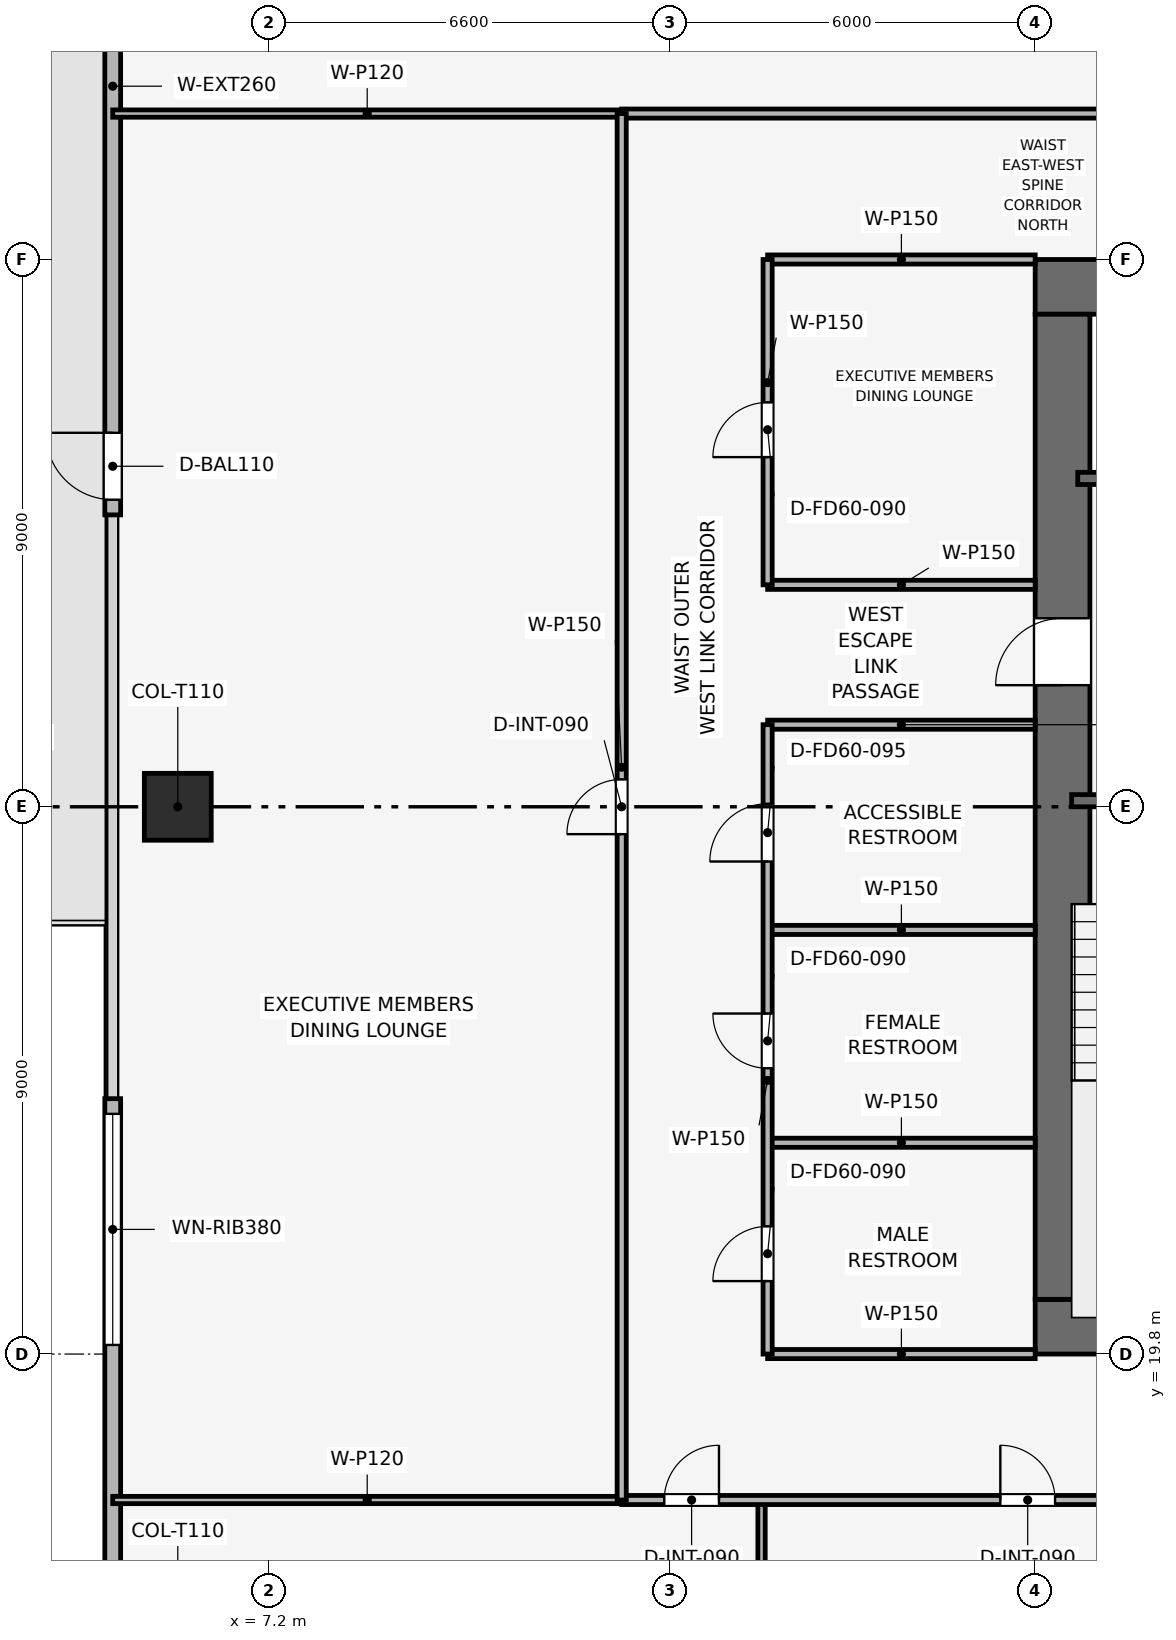
"""IFC4 building model, lengths in metres.
Left out: names, types, materials, properties, quantities, classifications, styles, units other than length and angle.
Written with IfcOpenShell. Run it as: python <this file> out.ifc"""

import sys

from ifc_helpers import new_model, si_unit, direction, frame, frame_2d, origin, origin_2d, place, context, subcontext, project, spatial, rectangle, extrude, element, fill, save


model = new_model("IFC4")
c1 = context("Model", 3, precision=1e-05, world=origin(), true_north=direction((0.0, 1.0)))
c2 = subcontext(c1, "Body", "Model", "MODEL_VIEW")
j1 = project(units=[si_unit("LENGTHUNIT", "METRE"), si_unit("PLANEANGLEUNIT", "RADIAN")], contexts=[c1])
p1 = place(None, origin())
s1 = spatial("IfcSite", under=j1, at=p1, CompositionType="ELEMENT")
p2 = place(p1, origin())
s2 = spatial("IfcBuilding", under=s1, at=p2, CompositionType="ELEMENT")
p3 = place(p2, frame((0.0, 0.0, 149.55)))
s3 = spatial("IfcBuildingStorey", under=s2, at=p3, CompositionType="ELEMENT", Elevation=149.55)
p4 = place(p3, frame((19.8, 20.25, 0.0), z_axis=(0.0, 0.0, 1.0), x_axis=(1.0, 0.0, 0.0)))
e1 = element("IfcWall", 1, at=p4, inside=s3, PredefinedType="SHEAR", context=c2, shape_type="SweptSolid", body=[
    extrude(rectangle(XDim=18.0, YDim=0.9, at=frame_2d((9.0, 0.0))), origin(), (0.0, 0.0, 1.0), 3.75),
])
p5 = place(p4, frame((8.4, 0.0, 0.0)))
e2 = element("IfcOpeningElement", 2, at=p5, cuts=e1, PredefinedType="OPENING", context=c2, shape_type="SweptSolid", body=[
    extrude(rectangle(XDim=1.2, YDim=2.2, at=frame_2d((0.6, 1.1))), frame((0.0, 0.46, 0.0), z_axis=(0.0, -1.0, 0.0), x_axis=(1.0, 0.0, 0.0)), (0.0, 0.0, 1.0), 0.92),
])
p6 = place(p3, frame((19.8, 37.35, 0.0), z_axis=(0.0, 0.0, 1.0), x_axis=(1.0, 0.0, 0.0)))
e3 = element("IfcWall", 3, at=p6, inside=s3, PredefinedType="SHEAR", context=c2, shape_type="SweptSolid", body=[
    extrude(rectangle(XDim=18.0, YDim=0.9, at=frame_2d((9.0, 0.0))), origin(), (0.0, 0.0, 1.0), 3.75),
])
p7 = place(p6, frame((7.05, 0.0, 0.0)))
e4 = element("IfcOpeningElement", 4, at=p7, cuts=e3, PredefinedType="OPENING", context=c2, shape_type="SweptSolid", body=[
    extrude(rectangle(XDim=1.1, YDim=2.15, at=frame_2d((0.55, 1.075))), frame((0.0, 0.46, 0.0), z_axis=(0.0, -1.0, 0.0), x_axis=(1.0, 0.0, 0.0)), (0.0, 0.0, 1.0), 0.92),
])
p8 = place(p3, frame((20.25, 20.7, 0.0), z_axis=(0.0, 0.0, 1.0), x_axis=(0.0, 1.0, 0.0)))
e5 = element("IfcWall", 5, at=p8, inside=s3, PredefinedType="SHEAR", context=c2, shape_type="SweptSolid", body=[
    extrude(rectangle(XDim=16.2, YDim=0.9, at=frame_2d((8.1, 0.0))), origin(), (0.0, 0.0, 1.0), 3.75),
])
p9 = place(p8, frame((10.1, 0.0, 0.0)))
e6 = element("IfcOpeningElement", 6, at=p9, cuts=e5, PredefinedType="OPENING", context=c2, shape_type="SweptSolid", body=[
    extrude(rectangle(XDim=1.1, YDim=2.15, at=frame_2d((0.55, 1.075))), frame((0.0, 0.46, 0.0), z_axis=(0.0, -1.0, 0.0), x_axis=(1.0, 0.0, 0.0)), (0.0, 0.0, 1.0), 0.92),
])
p10 = place(p3, frame((5.7, 28.8, 0.003), z_axis=(0.0, 0.0, 1.0), x_axis=(1.0, 0.0, 0.0)))
e7 = element("IfcColumn", 7, at=p10, inside=s3, PredefinedType="COLUMN", context=c2, shape_type="SweptSolid", body=[
    extrude(rectangle(XDim=1.1, YDim=1.1, at=origin_2d()), origin(), (0.0, 0.0, 1.0), 3.489),
])
p11 = place(p3, frame((4.63, 11.4, 0.0), z_axis=(0.0, 0.0, 1.0), x_axis=(0.0, 1.0, 0.0)))
e8 = element("IfcWall", 8, at=p11, inside=s3, PredefinedType="SOLIDWALL", context=c2, shape_type="SweptSolid", body=[
    extrude(rectangle(XDim=12.6, YDim=0.26, at=frame_2d((6.3, 0.0))), origin(), (0.0, 0.0, 1.0), 3.495),
])
p12 = place(p11, frame((8.55, 0.0, 0.9)))
e9 = element("IfcOpeningElement", 9, at=p12, cuts=e8, PredefinedType="OPENING", context=c2, shape_type="SweptSolid", body=[
    extrude(rectangle(XDim=3.8, YDim=1.9, at=frame_2d((1.9, 0.95))), frame((0.0, 0.14, 0.0), z_axis=(0.0, -1.0, 0.0), x_axis=(1.0, 0.0, 0.0)), (0.0, 0.0, 1.0), 0.28),
])
p13 = place(p3, frame((4.63, 33.6, 0.0), z_axis=(0.0, 0.0, 1.0), x_axis=(0.0, 1.0, 0.0)))
e10 = element("IfcWall", 10, at=p13, inside=s3, PredefinedType="SOLIDWALL", context=c2, shape_type="SweptSolid", body=[
    extrude(rectangle(XDim=12.6, YDim=0.26, at=frame_2d((6.3, 0.0))), origin(), (0.0, 0.0, 1.0), 3.495),
])
p14 = place(p13, frame((0.25, 0.0, 0.0)))
e11 = element("IfcOpeningElement", 11, at=p14, cuts=e10, PredefinedType="OPENING", context=c2, shape_type="SweptSolid", body=[
    extrude(rectangle(XDim=1.1, YDim=2.2, at=frame_2d((0.55, 1.1))), frame((0.0, 0.14, 0.0), z_axis=(0.0, -1.0, 0.0), x_axis=(1.0, 0.0, 0.0)), (0.0, 0.0, 1.0), 0.28),
])
p15 = place(p3, frame((20.4, 28.9, 0.0), z_axis=(0.0, 0.0, 1.0), x_axis=(1.0, 0.0, 0.0)))
e12 = element("IfcWall", 12, at=p15, inside=s3, PredefinedType="SHEAR", context=c2, shape_type="SweptSolid", body=[
    extrude(rectangle(XDim=3.15, YDim=0.2, at=frame_2d((1.575, 0.0))), origin(), (0.0, 0.0, 1.0), 3.495),
])
p16 = place(p15, frame((0.8, 0.0, 0.0)))
e13 = element("IfcOpeningElement", 13, at=p16, cuts=e12, PredefinedType="OPENING", context=c2, shape_type="SweptSolid", body=[
    extrude(rectangle(XDim=1.0, YDim=2.1, at=frame_2d((0.5, 1.05))), frame((0.0, 0.11, 0.0), z_axis=(0.0, -1.0, 0.0), x_axis=(1.0, 0.0, 0.0)), (0.0, 0.0, 1.0), 0.22),
])
p17 = place(p3, frame((20.5, 34.2, 0.0), z_axis=(0.0, 0.0, 1.0), x_axis=(1.0, 0.0, 0.0)))
e14 = element("IfcWall", 14, at=p17, inside=s3, PredefinedType="SHEAR", context=c2, shape_type="SweptSolid", body=[
    extrude(rectangle(XDim=3.05, YDim=0.2, at=frame_2d((1.525, 0.0))), origin(), (0.0, 0.0, 1.0), 3.495),
])
p18 = place(p17, frame((0.75, 0.0, 0.0)))
e15 = element("IfcOpeningElement", 15, at=p18, cuts=e14, PredefinedType="OPENING", context=c2, shape_type="SweptSolid", body=[
    extrude(rectangle(XDim=1.1, YDim=2.15, at=frame_2d((0.55, 1.075))), frame((0.0, 0.11, 0.0), z_axis=(0.0, -1.0, 0.0), x_axis=(1.0, 0.0, 0.0)), (0.0, 0.0, 1.0), 0.22),
])
p19 = place(p3, frame((15.4, 19.8, 0.0), z_axis=(0.0, 0.0, 1.0), x_axis=(1.0, 0.0, 0.0)))
e16 = element("IfcWall", 16, at=p19, inside=s3, PredefinedType="PARTITIONING", context=c2, shape_type="SweptSolid", body=[
    extrude(rectangle(XDim=4.4, YDim=0.15, at=frame_2d((2.2, 0.0))), origin(), (0.0, 0.0, 1.0), 3.03),
])
for number, where, z_axis, x_axis in (
    (17, (15.4, 23.275, 0.0), (0.0, 0.0, 1.0), (1.0, 0.0, 0.0)),
    (18, (15.4, 26.775, 0.0), (0.0, 0.0, 1.0), (1.0, 0.0, 0.0)),
    (19, (15.4, 30.15, 0.0), (0.0, 0.0, 1.0), (1.0, 0.0, 0.0)),
    (20, (15.4, 32.45, 0.0), (0.0, 0.0, 1.0), (1.0, 0.0, 0.0)),
):
    element("IfcWall", number, at=place(p3, frame(where, z_axis=z_axis, x_axis=x_axis)), inside=s3, PredefinedType="PARTITIONING", context=c2, shape_type="SweptSolid", body=[
        extrude(rectangle(XDim=4.4, YDim=0.15, at=frame_2d((2.2, 0.0))), origin(), (0.0, 0.0, 1.0), 3.495),
    ])
p20 = place(p3, frame((15.4, 37.8, 0.0), z_axis=(0.0, 0.0, 1.0), x_axis=(1.0, 0.0, 0.0)))
e21 = element("IfcWall", 21, at=p20, inside=s3, PredefinedType="PARTITIONING", context=c2, shape_type="SweptSolid", body=[
    extrude(rectangle(XDim=4.4, YDim=0.15, at=frame_2d((2.2, 0.0))), origin(), (0.0, 0.0, 1.0), 3.03),
])
p21 = place(p3, frame((15.4, 19.8, 0.0), z_axis=(0.0, 0.0, 1.0), x_axis=(0.0, 1.0, 0.0)))
e22 = element("IfcWall", 22, at=p21, inside=s3, PredefinedType="PARTITIONING", context=c2, shape_type="SweptSolid", body=[
    extrude(rectangle(XDim=10.35, YDim=0.15, at=frame_2d((5.175, 0.0))), origin(), (0.0, 0.0, 1.0), 3.03),
])
p22 = place(p21, frame((1.2, 0.0, 0.0)))
e23 = element("IfcOpeningElement", 23, at=p22, cuts=e22, PredefinedType="OPENING", context=c2, shape_type="SweptSolid", body=[
    extrude(rectangle(XDim=0.9, YDim=2.1, at=frame_2d((0.45, 1.05))), frame((0.0, 0.085, 0.0), z_axis=(0.0, -1.0, 0.0), x_axis=(1.0, 0.0, 0.0)), (0.0, 0.0, 1.0), 0.17),
])
p23 = place(p21, frame((4.7, 0.0, 0.0)))
e24 = element("IfcOpeningElement", 24, at=p23, cuts=e22, PredefinedType="OPENING", context=c2, shape_type="SweptSolid", body=[
    extrude(rectangle(XDim=0.9, YDim=2.1, at=frame_2d((0.45, 1.05))), frame((0.0, 0.085, 0.0), z_axis=(0.0, -1.0, 0.0), x_axis=(1.0, 0.0, 0.0)), (0.0, 0.0, 1.0), 0.17),
])
p24 = place(p21, frame((8.1, 0.0, 0.0)))
e25 = element("IfcOpeningElement", 25, at=p24, cuts=e22, PredefinedType="OPENING", context=c2, shape_type="SweptSolid", body=[
    extrude(rectangle(XDim=0.95, YDim=2.1, at=frame_2d((0.475, 1.05))), frame((0.0, 0.085, 0.0), z_axis=(0.0, -1.0, 0.0), x_axis=(1.0, 0.0, 0.0)), (0.0, 0.0, 1.0), 0.17),
])
p25 = place(p3, frame((15.4, 32.45, 0.0), z_axis=(0.0, 0.0, 1.0), x_axis=(0.0, 1.0, 0.0)))
e26 = element("IfcWall", 26, at=p25, inside=s3, PredefinedType="PARTITIONING", context=c2, shape_type="SweptSolid", body=[
    extrude(rectangle(XDim=5.35, YDim=0.15, at=frame_2d((2.675, 0.0))), origin(), (0.0, 0.0, 1.0), 3.03),
])
p26 = place(p25, frame((2.1, 0.0, 0.0)))
e27 = element("IfcOpeningElement", 27, at=p26, cuts=e26, PredefinedType="OPENING", context=c2, shape_type="SweptSolid", body=[
    extrude(rectangle(XDim=0.9, YDim=2.1, at=frame_2d((0.45, 1.05))), frame((0.0, 0.085, 0.0), z_axis=(0.0, -1.0, 0.0), x_axis=(1.0, 0.0, 0.0)), (0.0, 0.0, 1.0), 0.17),
])
p27 = place(p3, frame((15.3, 4.63, 0.0), z_axis=(0.0, 0.0, 1.0), x_axis=(0.0, 1.0, 0.0)))
e28 = element("IfcWall", 28, at=p27, inside=s3, PredefinedType="PARTITIONING", context=c2, shape_type="SweptSolid", body=[
    extrude(rectangle(XDim=12.77, YDim=0.12, at=frame_2d((6.385, 0.0))), origin(), (0.0, 0.0, 1.0), 2.98),
])
for number, where, z_axis, x_axis in (
    (29, (4.63, 17.4, 0.0), (0.0, 0.0, 1.0), (1.0, 0.0, 0.0)),
    (30, (4.63, 40.2, 0.0), (0.0, 0.0, 1.0), (1.0, 0.0, 0.0)),
):
    element("IfcWall", number, at=place(p3, frame(where, z_axis=z_axis, x_axis=x_axis)), inside=s3, PredefinedType="PARTITIONING", context=c2, shape_type="SweptSolid", body=[
        extrude(rectangle(XDim=8.37, YDim=0.12, at=frame_2d((4.185, 0.0))), origin(), (0.0, 0.0, 1.0), 2.98),
    ])
p28 = place(p3, frame((13.0, 17.4, 0.0), z_axis=(0.0, 0.0, 1.0), x_axis=(1.0, 0.0, 0.0)))
e31 = element("IfcWall", 31, at=p28, inside=s3, PredefinedType="PARTITIONING", context=c2, shape_type="SweptSolid", body=[
    extrude(rectangle(XDim=31.6, YDim=0.15, at=frame_2d((15.8, 0.0))), origin(), (0.0, 0.0, 1.0), 3.03),
])
p29 = place(p28, frame((0.7, 0.0, 0.0)))
e32 = element("IfcOpeningElement", 32, at=p29, cuts=e31, PredefinedType="OPENING", context=c2, shape_type="SweptSolid", body=[
    extrude(rectangle(XDim=0.9, YDim=2.1, at=frame_2d((0.45, 1.05))), frame((0.0, 0.085, 0.0), z_axis=(0.0, -1.0, 0.0), x_axis=(1.0, 0.0, 0.0)), (0.0, 0.0, 1.0), 0.17),
])
p30 = place(p28, frame((6.227, 0.0, 0.0)))
e33 = element("IfcOpeningElement", 33, at=p30, cuts=e31, PredefinedType="OPENING", context=c2, shape_type="SweptSolid", body=[
    extrude(rectangle(XDim=0.9, YDim=2.1, at=frame_2d((0.45, 1.05))), frame((0.0, 0.085, 0.0), z_axis=(0.0, -1.0, 0.0), x_axis=(1.0, 0.0, 0.0)), (0.0, 0.0, 1.0), 0.17),
])
p31 = place(p28, frame((15.279, 0.0, 0.0)))
e34 = element("IfcOpeningElement", 34, at=p31, cuts=e31, PredefinedType="OPENING", context=c2, shape_type="SweptSolid", body=[
    extrude(rectangle(XDim=0.9, YDim=2.1, at=frame_2d((0.45, 1.05))), frame((0.0, 0.085, 0.0), z_axis=(0.0, -1.0, 0.0), x_axis=(1.0, 0.0, 0.0)), (0.0, 0.0, 1.0), 0.17),
])
p32 = place(p28, frame((25.552, 0.0, 0.0)))
e35 = element("IfcOpeningElement", 35, at=p32, cuts=e31, PredefinedType="OPENING", context=c2, shape_type="SweptSolid", body=[
    extrude(rectangle(XDim=0.9, YDim=2.1, at=frame_2d((0.45, 1.05))), frame((0.0, 0.085, 0.0), z_axis=(0.0, -1.0, 0.0), x_axis=(1.0, 0.0, 0.0)), (0.0, 0.0, 1.0), 0.17),
])
p33 = place(p3, frame((13.0, 40.2, 0.0), z_axis=(0.0, 0.0, 1.0), x_axis=(1.0, 0.0, 0.0)))
e36 = element("IfcWall", 36, at=p33, inside=s3, PredefinedType="PARTITIONING", context=c2, shape_type="SweptSolid", body=[
    extrude(rectangle(XDim=31.6, YDim=0.15, at=frame_2d((15.8, 0.0))), origin(), (0.0, 0.0, 1.0), 3.03),
])
p34 = place(p33, frame((8.395, 0.0, 0.0)))
e37 = element("IfcOpeningElement", 37, at=p34, cuts=e36, PredefinedType="OPENING", context=c2, shape_type="SweptSolid", body=[
    extrude(rectangle(XDim=0.9, YDim=2.1, at=frame_2d((0.45, 1.05))), frame((0.0, 0.085, 0.0), z_axis=(0.0, -1.0, 0.0), x_axis=(1.0, 0.0, 0.0)), (0.0, 0.0, 1.0), 0.17),
])
p35 = place(p33, frame((24.195, 0.0, 0.0)))
e38 = element("IfcOpeningElement", 38, at=p35, cuts=e36, PredefinedType="OPENING", context=c2, shape_type="SweptSolid", body=[
    extrude(rectangle(XDim=0.9, YDim=2.1, at=frame_2d((0.45, 1.05))), frame((0.0, 0.085, 0.0), z_axis=(0.0, -1.0, 0.0), x_axis=(1.0, 0.0, 0.0)), (0.0, 0.0, 1.0), 0.17),
])
p36 = place(p3, frame((13.0, 17.4, 0.0), z_axis=(0.0, 0.0, 1.0), x_axis=(0.0, 1.0, 0.0)))
e39 = element("IfcWall", 39, at=p36, inside=s3, PredefinedType="PARTITIONING", context=c2, shape_type="SweptSolid", body=[
    extrude(rectangle(XDim=22.8, YDim=0.15, at=frame_2d((11.4, 0.0))), origin(), (0.0, 0.0, 1.0), 3.03),
])
p37 = place(p36, frame((10.95, 0.0, 0.0)))
e40 = element("IfcOpeningElement", 40, at=p37, cuts=e39, PredefinedType="OPENING", context=c2, shape_type="SweptSolid", body=[
    extrude(rectangle(XDim=0.9, YDim=2.1, at=frame_2d((0.45, 1.05))), frame((0.0, 0.085, 0.0), z_axis=(0.0, -1.0, 0.0), x_axis=(1.0, 0.0, 0.0)), (0.0, 0.0, 1.0), 0.17),
])
p38 = place(p14, origin())
e41 = element("IfcDoor", 41, at=p38, inside=s3, OperationType="SINGLE_SWING_RIGHT", PredefinedType="DOOR", context=c2, shape_type="SweptSolid", body=[
    extrude(rectangle(XDim=1.1, YDim=2.2, at=frame_2d((0.55, 1.1))), frame((0.0, 0.025, 0.0), z_axis=(0.0, -1.0, 0.0), x_axis=(1.0, 0.0, 0.0)), (0.0, 0.0, 1.0), 0.05),
])
fill(e11, e41)
p39 = place(p12, origin())
e42 = element("IfcWindow", 42, at=p39, inside=s3, PartitioningType="SINGLE_PANEL", PredefinedType="WINDOW", context=c2, shape_type="SweptSolid", body=[
    extrude(rectangle(XDim=3.8, YDim=1.9, at=frame_2d((1.9, 0.95))), frame((0.0, 0.03, 0.0), z_axis=(0.0, -1.0, 0.0), x_axis=(1.0, 0.0, 0.0)), (0.0, 0.0, 1.0), 0.06),
])
fill(e9, e42)
p40 = place(p22, origin())
e43 = element("IfcDoor", 43, at=p40, inside=s3, OperationType="SINGLE_SWING_LEFT", PredefinedType="DOOR", context=c2, shape_type="SweptSolid", body=[
    extrude(rectangle(XDim=0.9, YDim=2.1, at=frame_2d((0.45, 1.05))), frame((0.0, 0.025, 0.0), z_axis=(0.0, -1.0, 0.0), x_axis=(1.0, 0.0, 0.0)), (0.0, 0.0, 1.0), 0.05),
])
fill(e23, e43)
p41 = place(p23, origin())
e44 = element("IfcDoor", 44, at=p41, inside=s3, OperationType="SINGLE_SWING_RIGHT", PredefinedType="DOOR", context=c2, shape_type="SweptSolid", body=[
    extrude(rectangle(XDim=0.9, YDim=2.1, at=frame_2d((0.45, 1.05))), frame((0.0, 0.025, 0.0), z_axis=(0.0, -1.0, 0.0), x_axis=(1.0, 0.0, 0.0)), (0.0, 0.0, 1.0), 0.05),
])
fill(e24, e44)
p42 = place(p24, origin())
e45 = element("IfcDoor", 45, at=p42, inside=s3, OperationType="SINGLE_SWING_LEFT", PredefinedType="DOOR", context=c2, shape_type="SweptSolid", body=[
    extrude(rectangle(XDim=0.95, YDim=2.1, at=frame_2d((0.475, 1.05))), frame((0.0, 0.025, 0.0), z_axis=(0.0, -1.0, 0.0), x_axis=(1.0, 0.0, 0.0)), (0.0, 0.0, 1.0), 0.05),
])
fill(e25, e45)
p43 = place(p26, origin())
e46 = element("IfcDoor", 46, at=p43, inside=s3, OperationType="SINGLE_SWING_LEFT", PredefinedType="DOOR", context=c2, shape_type="SweptSolid", body=[
    extrude(rectangle(XDim=0.9, YDim=2.1, at=frame_2d((0.45, 1.05))), frame((0.0, 0.025, 0.0), z_axis=(0.0, -1.0, 0.0), x_axis=(1.0, 0.0, 0.0)), (0.0, 0.0, 1.0), 0.05),
])
fill(e27, e46)
p44 = place(p29, origin())
e47 = element("IfcDoor", 47, at=p44, inside=s3, OperationType="SINGLE_SWING_RIGHT", PredefinedType="DOOR", context=c2, shape_type="SweptSolid", body=[
    extrude(rectangle(XDim=0.9, YDim=2.1, at=frame_2d((0.45, 1.05))), frame((0.0, 0.025, 0.0), z_axis=(0.0, -1.0, 0.0), x_axis=(1.0, 0.0, 0.0)), (0.0, 0.0, 1.0), 0.05),
])
fill(e32, e47)
p45 = place(p30, origin())
e48 = element("IfcDoor", 48, at=p45, inside=s3, OperationType="SINGLE_SWING_LEFT", PredefinedType="DOOR", context=c2, shape_type="SweptSolid", body=[
    extrude(rectangle(XDim=0.9, YDim=2.1, at=frame_2d((0.45, 1.05))), frame((0.0, 0.025, 0.0), z_axis=(0.0, -1.0, 0.0), x_axis=(1.0, 0.0, 0.0)), (0.0, 0.0, 1.0), 0.05),
])
fill(e33, e48)
p46 = place(p37, origin())
e49 = element("IfcDoor", 49, at=p46, inside=s3, OperationType="SINGLE_SWING_LEFT", PredefinedType="DOOR", context=c2, shape_type="SweptSolid", body=[
    extrude(rectangle(XDim=0.9, YDim=2.1, at=frame_2d((0.45, 1.05))), frame((0.0, 0.025, 0.0), z_axis=(0.0, -1.0, 0.0), x_axis=(1.0, 0.0, 0.0)), (0.0, 0.0, 1.0), 0.05),
])
fill(e40, e49)
p47 = place(p9, origin())
e50 = element("IfcDoor", 50, at=p47, inside=s3, OperationType="SINGLE_SWING_LEFT", PredefinedType="DOOR", context=c2, shape_type="SweptSolid", body=[
    extrude(rectangle(XDim=1.1, YDim=2.15, at=frame_2d((0.55, 1.075))), frame((0.0, 0.025, 0.0), z_axis=(0.0, -1.0, 0.0), x_axis=(1.0, 0.0, 0.0)), (0.0, 0.0, 1.0), 0.05),
])
fill(e6, e50)
save(model, sys.argv[1])
